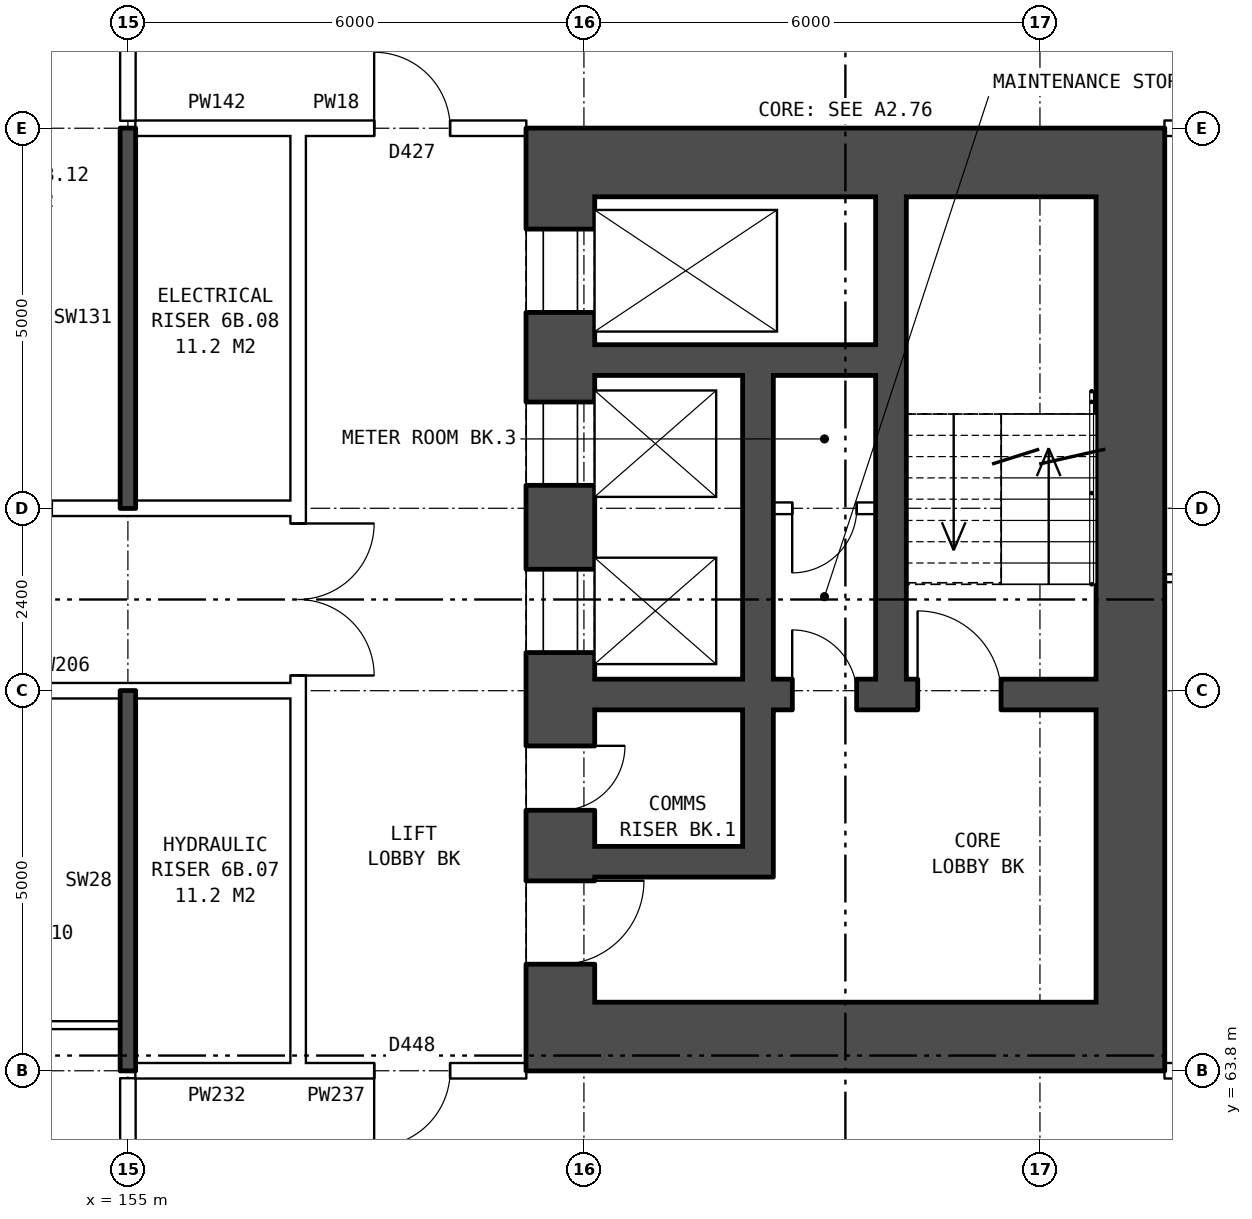
"""IFC4 building model, lengths in metres.
Left out: names, types, materials, properties, quantities, classifications, styles, units other than length and angle.
Written with IfcOpenShell. Run it as: python <this file> out.ifc"""

import sys

from ifc_helpers import new_model, si_unit, direction, frame, frame_2d, origin, place, context, subcontext, project, spatial, rectangle, extrude, element, fill, save


model = new_model("IFC4")
c1 = context("Model", 3, precision=1e-05, world=origin(), true_north=direction((0.0, 1.0)))
c2 = subcontext(c1, "Body", "Model", "MODEL_VIEW")
j1 = project(units=[si_unit("LENGTHUNIT", "METRE"), si_unit("PLANEANGLEUNIT", "RADIAN")], contexts=[c1])
p1 = place(None, origin())
s1 = spatial("IfcSite", under=j1, at=p1, CompositionType="ELEMENT")
p2 = place(p1, origin())
s2 = spatial("IfcBuilding", under=s1, at=p2, CompositionType="ELEMENT")
p3 = place(p2, frame((0.0, 0.0, 25.7)))
s3 = spatial("IfcBuildingStorey", under=s2, at=p3, CompositionType="ELEMENT", Elevation=25.7)
p4 = place(p3, frame((160.69, 75.3, 0.0), z_axis=(0.0, 0.0, 1.0), x_axis=(0.0, -1.0, 0.0)))
e1 = element("IfcWall", 1, at=p4, inside=s3, PredefinedType="SHEAR", context=c2, shape_type="SweptSolid", body=[
    extrude(rectangle(XDim=10.6, YDim=0.9, at=frame_2d((5.3, 0.0))), origin(), (0.0, 0.0, 1.0), 2.85),
])
p5 = place(p4, frame((0.425, 0.0, 0.0)))
e2 = element("IfcOpeningElement", 2, at=p5, cuts=e1, PredefinedType="OPENING", context=c2, shape_type="SweptSolid", body=[
    extrude(rectangle(XDim=1.1, YDim=2.1, at=frame_2d((0.55, 1.05))), frame((0.0, 0.46, 0.0), z_axis=(0.0, -1.0, 0.0), x_axis=(1.0, 0.0, 0.0)), (0.0, 0.0, 1.0), 0.92),
])
p6 = place(p4, frame((2.7, 0.0, 0.0)))
e3 = element("IfcOpeningElement", 3, at=p6, cuts=e1, PredefinedType="OPENING", context=c2, shape_type="SweptSolid", body=[
    extrude(rectangle(XDim=1.1, YDim=2.1, at=frame_2d((0.55, 1.05))), frame((0.0, 0.46, 0.0), z_axis=(0.0, -1.0, 0.0), x_axis=(1.0, 0.0, 0.0)), (0.0, 0.0, 1.0), 0.92),
])
p7 = place(p4, frame((4.9, 0.0, 0.0)))
e4 = element("IfcOpeningElement", 4, at=p7, cuts=e1, PredefinedType="OPENING", context=c2, shape_type="SweptSolid", body=[
    extrude(rectangle(XDim=1.1, YDim=2.1, at=frame_2d((0.55, 1.05))), frame((0.0, 0.46, 0.0), z_axis=(0.0, -1.0, 0.0), x_axis=(1.0, 0.0, 0.0)), (0.0, 0.0, 1.0), 0.92),
])
p8 = place(p4, frame((9.0, 0.0, 0.0)))
e5 = element("IfcOpeningElement", 5, at=p8, cuts=e1, PredefinedType="OPENING", context=c2, shape_type="SweptSolid", body=[
    extrude(rectangle(XDim=1.1, YDim=2.1, at=frame_2d((0.55, 1.05))), frame((0.0, 0.46, 0.0), z_axis=(0.0, -1.0, 0.0), x_axis=(1.0, 0.0, 0.0)), (0.0, 0.0, 1.0), 0.92),
])
p9 = place(p4, frame((7.225, 0.0, 0.0)))
e6 = element("IfcOpeningElement", 6, at=p9, cuts=e1, PredefinedType="OPENING", context=c2, shape_type="SweptSolid", body=[
    extrude(rectangle(XDim=0.85, YDim=2.1, at=frame_2d((0.425, 1.05))), frame((0.0, 0.46, 0.0), z_axis=(0.0, -1.0, 0.0), x_axis=(1.0, 0.0, 0.0)), (0.0, 0.0, 1.0), 0.92),
])
p10 = place(p3, frame((168.19, 75.3, 0.0), z_axis=(0.0, 0.0, 1.0), x_axis=(0.0, -1.0, 0.0)))
e7 = element("IfcWall", 7, at=p10, inside=s3, PredefinedType="SHEAR", context=c2, shape_type="SweptSolid", body=[
    extrude(rectangle(XDim=10.6, YDim=0.9, at=frame_2d((5.3, 0.0))), origin(), (0.0, 0.0, 1.0), 2.85),
])
for number, where, z_axis, x_axis in (
    (8, (160.24, 75.75, 0.0), (0.0, 0.0, 1.0), (1.0, 0.0, 0.0)),
    (9, (160.24, 64.25, 0.0), (0.0, 0.0, 1.0), (1.0, 0.0, 0.0)),
):
    element("IfcWall", number, at=place(p3, frame(where, z_axis=z_axis, x_axis=x_axis)), inside=s3, PredefinedType="SHEAR", context=c2, shape_type="SweptSolid", body=[
        extrude(rectangle(XDim=8.4, YDim=0.9, at=frame_2d((4.2, 0.0))), origin(), (0.0, 0.0, 1.0), 2.85),
    ])
p11 = place(p3, frame((161.14, 73.15, 0.0), z_axis=(0.0, 0.0, 1.0), x_axis=(1.0, 0.0, 0.0)))
e10 = element("IfcWall", 10, at=p11, inside=s3, PredefinedType="SHEAR", context=c2, shape_type="SweptSolid", body=[
    extrude(rectangle(XDim=3.7, YDim=0.4, at=frame_2d((1.85, 0.0))), origin(), (0.0, 0.0, 1.0), 2.85),
])
p12 = place(p3, frame((163.49, 71.2, 0.0), z_axis=(0.0, 0.0, 1.0), x_axis=(1.0, 0.0, 0.0)))
e11 = element("IfcWall", 11, at=p12, inside=s3, PredefinedType="PARTITIONING", context=c2, shape_type="SweptSolid", body=[
    extrude(rectangle(XDim=1.35, YDim=0.15, at=frame_2d((0.675, 0.0))), origin(), (0.0, 0.0, 1.0), 2.85),
])
p13 = place(p12, frame((0.25, 0.0, 0.0)))
e12 = element("IfcOpeningElement", 12, at=p13, cuts=e11, PredefinedType="OPENING", context=c2, shape_type="SweptSolid", body=[
    extrude(rectangle(XDim=0.85, YDim=2.1, at=frame_2d((0.425, 1.05))), frame((0.0, 0.085, 0.0), z_axis=(0.0, -1.0, 0.0), x_axis=(1.0, 0.0, 0.0)), (0.0, 0.0, 1.0), 0.17),
])
p14 = place(p3, frame((161.14, 68.75, 0.0), z_axis=(0.0, 0.0, 1.0), x_axis=(1.0, 0.0, 0.0)))
e13 = element("IfcWall", 13, at=p14, inside=s3, PredefinedType="SHEAR", context=c2, shape_type="SweptSolid", body=[
    extrude(rectangle(XDim=6.6, YDim=0.4, at=frame_2d((3.3, 0.0))), origin(), (0.0, 0.0, 1.0), 2.85),
])
p15 = place(p14, frame((4.25, 0.0, 0.0)))
e14 = element("IfcOpeningElement", 14, at=p15, cuts=e13, PredefinedType="OPENING", context=c2, shape_type="SweptSolid", body=[
    extrude(rectangle(XDim=1.1, YDim=2.1, at=frame_2d((0.55, 1.05))), frame((0.0, 0.21, 0.0), z_axis=(0.0, -1.0, 0.0), x_axis=(1.0, 0.0, 0.0)), (0.0, 0.0, 1.0), 0.42),
])
p16 = place(p14, frame((2.6, 0.0, 0.0)))
e15 = element("IfcOpeningElement", 15, at=p16, cuts=e13, PredefinedType="OPENING", context=c2, shape_type="SweptSolid", body=[
    extrude(rectangle(XDim=0.85, YDim=2.1, at=frame_2d((0.425, 1.05))), frame((0.0, 0.21, 0.0), z_axis=(0.0, -1.0, 0.0), x_axis=(1.0, 0.0, 0.0)), (0.0, 0.0, 1.0), 0.42),
])
p17 = place(p3, frame((161.14, 66.55, 0.0), z_axis=(0.0, 0.0, 1.0), x_axis=(1.0, 0.0, 0.0)))
e16 = element("IfcWall", 16, at=p17, inside=s3, PredefinedType="SHEAR", context=c2, shape_type="SweptSolid", body=[
    extrude(rectangle(XDim=1.95, YDim=0.4, at=frame_2d((0.975, 0.0))), origin(), (0.0, 0.0, 1.0), 2.85),
])
p18 = place(p3, frame((163.29, 72.95, 0.0), z_axis=(0.0, 0.0, 1.0), x_axis=(0.0, -1.0, 0.0)))
e17 = element("IfcWall", 17, at=p18, inside=s3, PredefinedType="SHEAR", context=c2, shape_type="SweptSolid", body=[
    extrude(rectangle(XDim=4.0, YDim=0.4, at=frame_2d((2.0, 0.0))), origin(), (0.0, 0.0, 1.0), 2.85),
])
p19 = place(p3, frame((163.29, 68.55, 0.0), z_axis=(0.0, 0.0, 1.0), x_axis=(0.0, -1.0, 0.0)))
e18 = element("IfcWall", 18, at=p19, inside=s3, PredefinedType="SHEAR", context=c2, shape_type="SweptSolid", body=[
    extrude(rectangle(XDim=2.2, YDim=0.4, at=frame_2d((1.1, 0.0))), origin(), (0.0, 0.0, 1.0), 2.85),
])
p20 = place(p3, frame((165.04, 75.3, 0.0), z_axis=(0.0, 0.0, 1.0), x_axis=(0.0, -1.0, 0.0)))
e19 = element("IfcWall", 19, at=p20, inside=s3, PredefinedType="SHEAR", context=c2, shape_type="SweptSolid", body=[
    extrude(rectangle(XDim=6.35, YDim=0.4, at=frame_2d((3.175, 0.0))), origin(), (0.0, 0.0, 1.0), 2.85),
])
p21 = place(p3, frame((157.24, 63.9, 0.0), z_axis=(0.0, 0.0, 1.0), x_axis=(0.0, 1.0, 0.0)))
e20 = element("IfcWall", 20, at=p21, inside=s3, PredefinedType="PARTITIONING", context=c2, shape_type="SweptSolid", body=[
    extrude(rectangle(XDim=12.2, YDim=0.2, at=frame_2d((6.1, 0.0))), origin(), (0.0, 0.0, 1.0), 2.85),
])
p22 = place(p21, frame((5.1, 0.0, 0.0)))
e21 = element("IfcOpeningElement", 21, at=p22, cuts=e20, PredefinedType="OPENING", context=c2, shape_type="SweptSolid", body=[
    extrude(rectangle(XDim=2.0, YDim=2.1, at=frame_2d((1.0, 1.05))), frame((0.0, 0.11, 0.0), z_axis=(0.0, -1.0, 0.0), x_axis=(1.0, 0.0, 0.0)), (0.0, 0.0, 1.0), 0.22),
])
p23 = place(p3, frame((155.1, 63.8, 0.0), z_axis=(0.0, 0.0, 1.0), x_axis=(1.0, 0.0, 0.0)))
e22 = element("IfcWall", 22, at=p23, inside=s3, PredefinedType="PARTITIONING", context=c2, shape_type="SweptSolid", body=[
    extrude(rectangle(XDim=2.14, YDim=0.2, at=frame_2d((1.07, 0.0))), origin(), (0.0, 0.0, 1.0), 2.85),
])
p24 = place(p3, frame((157.24, 63.8, 0.0), z_axis=(0.0, 0.0, 1.0), x_axis=(1.0, 0.0, 0.0)))
e23 = element("IfcWall", 23, at=p24, inside=s3, PredefinedType="PARTITIONING", context=c2, shape_type="SweptSolid", body=[
    extrude(rectangle(XDim=3.0, YDim=0.2, at=frame_2d((1.5, 0.0))), origin(), (0.0, 0.0, 1.0), 2.85),
])
p25 = place(p24, frame((1.0, 0.0, 0.0)))
e24 = element("IfcOpeningElement", 24, at=p25, cuts=e23, PredefinedType="OPENING", context=c2, shape_type="SweptSolid", body=[
    extrude(rectangle(XDim=1.0, YDim=2.1, at=frame_2d((0.5, 1.05))), frame((0.0, 0.11, 0.0), z_axis=(0.0, -1.0, 0.0), x_axis=(1.0, 0.0, 0.0)), (0.0, 0.0, 1.0), 0.22),
])
p26 = place(p3, frame((168.64, 63.8, 0.0), z_axis=(0.0, 0.0, 1.0), x_axis=(1.0, 0.0, 0.0)))
e25 = element("IfcWall", 25, at=p26, inside=s3, PredefinedType="PARTITIONING", context=c2, shape_type="SweptSolid", body=[
    extrude(rectangle(XDim=6.35, YDim=0.2, at=frame_2d((3.175, 0.0))), origin(), (0.0, 0.0, 1.0), 2.85),
])
p27 = place(p26, frame((1.78, 0.0, 0.0)))
e26 = element("IfcOpeningElement", 26, at=p27, cuts=e25, PredefinedType="OPENING", context=c2, shape_type="SweptSolid", body=[
    extrude(rectangle(XDim=0.8, YDim=2.1, at=frame_2d((0.4, 1.05))), frame((0.0, 0.11, 0.0), z_axis=(0.0, -1.0, 0.0), x_axis=(1.0, 0.0, 0.0)), (0.0, 0.0, 1.0), 0.22),
])
p28 = place(p3, frame((152.0, 64.4, 0.0), z_axis=(0.0, 0.0, 1.0), x_axis=(1.0, 0.0, 0.0)))
e27 = element("IfcWall", 27, at=p28, inside=s3, PredefinedType="PARTITIONING", context=c2, shape_type="SweptSolid", body=[
    extrude(rectangle(XDim=2.9, YDim=0.1, at=frame_2d((1.45, 0.0))), origin(), (0.0, 0.0, 1.0), 2.85),
])
p29 = place(p3, frame((142.76, 68.8, 0.0), z_axis=(0.0, 0.0, 1.0), x_axis=(1.0, 0.0, 0.0)))
e28 = element("IfcWall", 28, at=p29, inside=s3, PredefinedType="PARTITIONING", context=c2, shape_type="SweptSolid", body=[
    extrude(rectangle(XDim=14.48, YDim=0.2, at=frame_2d((7.24, 0.0))), origin(), (0.0, 0.0, 1.0), 2.85),
])
p30 = place(p29, frame((4.24, 0.0, 0.0)))
e29 = element("IfcOpeningElement", 29, at=p30, cuts=e28, PredefinedType="OPENING", context=c2, shape_type="SweptSolid", body=[
    extrude(rectangle(XDim=1.0, YDim=2.1, at=frame_2d((0.5, 1.05))), frame((0.0, 0.11, 0.0), z_axis=(0.0, -1.0, 0.0), x_axis=(1.0, 0.0, 0.0)), (0.0, 0.0, 1.0), 0.22),
])
p31 = place(p29, frame((7.24, 0.0, 0.0)))
e30 = element("IfcOpeningElement", 30, at=p31, cuts=e28, PredefinedType="OPENING", context=c2, shape_type="SweptSolid", body=[
    extrude(rectangle(XDim=1.0, YDim=2.1, at=frame_2d((0.5, 1.05))), frame((0.0, 0.11, 0.0), z_axis=(0.0, -1.0, 0.0), x_axis=(1.0, 0.0, 0.0)), (0.0, 0.0, 1.0), 0.22),
])
p32 = place(p3, frame((168.64, 70.28, 0.0), z_axis=(0.0, 0.0, 1.0), x_axis=(1.0, 0.0, 0.0)))
e31 = element("IfcWall", 31, at=p32, inside=s3, PredefinedType="PARTITIONING", context=c2, shape_type="SweptSolid", body=[
    extrude(rectangle(XDim=4.26, YDim=0.1, at=frame_2d((2.13, 0.0))), origin(), (0.0, 0.0, 1.0), 2.85),
])
p33 = place(p3, frame((142.76, 71.2, 0.0), z_axis=(0.0, 0.0, 1.0), x_axis=(1.0, 0.0, 0.0)))
e32 = element("IfcWall", 32, at=p33, inside=s3, PredefinedType="PARTITIONING", context=c2, shape_type="SweptSolid", body=[
    extrude(rectangle(XDim=14.48, YDim=0.2, at=frame_2d((7.24, 0.0))), origin(), (0.0, 0.0, 1.0), 2.85),
])
p34 = place(p33, frame((4.24, 0.0, 0.0)))
e33 = element("IfcOpeningElement", 33, at=p34, cuts=e32, PredefinedType="OPENING", context=c2, shape_type="SweptSolid", body=[
    extrude(rectangle(XDim=1.0, YDim=2.1, at=frame_2d((0.5, 1.05))), frame((0.0, 0.11, 0.0), z_axis=(0.0, -1.0, 0.0), x_axis=(1.0, 0.0, 0.0)), (0.0, 0.0, 1.0), 0.22),
])
p35 = place(p33, frame((10.24, 0.0, 0.0)))
e34 = element("IfcOpeningElement", 34, at=p35, cuts=e32, PredefinedType="OPENING", context=c2, shape_type="SweptSolid", body=[
    extrude(rectangle(XDim=1.0, YDim=2.1, at=frame_2d((0.5, 1.05))), frame((0.0, 0.11, 0.0), z_axis=(0.0, -1.0, 0.0), x_axis=(1.0, 0.0, 0.0)), (0.0, 0.0, 1.0), 0.22),
])
p36 = place(p3, frame((155.1, 76.2, 0.0), z_axis=(0.0, 0.0, 1.0), x_axis=(1.0, 0.0, 0.0)))
e35 = element("IfcWall", 35, at=p36, inside=s3, PredefinedType="PARTITIONING", context=c2, shape_type="SweptSolid", body=[
    extrude(rectangle(XDim=2.14, YDim=0.2, at=frame_2d((1.07, 0.0))), origin(), (0.0, 0.0, 1.0), 2.85),
])
p37 = place(p3, frame((157.24, 76.2, 0.0), z_axis=(0.0, 0.0, 1.0), x_axis=(1.0, 0.0, 0.0)))
e36 = element("IfcWall", 36, at=p37, inside=s3, PredefinedType="PARTITIONING", context=c2, shape_type="SweptSolid", body=[
    extrude(rectangle(XDim=3.0, YDim=0.2, at=frame_2d((1.5, 0.0))), origin(), (0.0, 0.0, 1.0), 2.85),
])
p38 = place(p37, frame((1.0, 0.0, 0.0)))
e37 = element("IfcOpeningElement", 37, at=p38, cuts=e36, PredefinedType="OPENING", context=c2, shape_type="SweptSolid", body=[
    extrude(rectangle(XDim=1.0, YDim=2.1, at=frame_2d((0.5, 1.05))), frame((0.0, 0.11, 0.0), z_axis=(0.0, -1.0, 0.0), x_axis=(1.0, 0.0, 0.0)), (0.0, 0.0, 1.0), 0.22),
])
p39 = place(p3, frame((168.64, 76.2, 0.0), z_axis=(0.0, 0.0, 1.0), x_axis=(1.0, 0.0, 0.0)))
e38 = element("IfcWall", 38, at=p39, inside=s3, PredefinedType="PARTITIONING", context=c2, shape_type="SweptSolid", body=[
    extrude(rectangle(XDim=6.35, YDim=0.2, at=frame_2d((3.175, 0.0))), origin(), (0.0, 0.0, 1.0), 2.85),
])
p40 = place(p39, frame((1.78, 0.0, 0.0)))
e39 = element("IfcOpeningElement", 39, at=p40, cuts=e38, PredefinedType="OPENING", context=c2, shape_type="SweptSolid", body=[
    extrude(rectangle(XDim=0.8, YDim=2.1, at=frame_2d((0.4, 1.05))), frame((0.0, 0.11, 0.0), z_axis=(0.0, -1.0, 0.0), x_axis=(1.0, 0.0, 0.0)), (0.0, 0.0, 1.0), 0.22),
])
p41 = place(p3, frame((155.0, 61.5, 0.0), z_axis=(0.0, 0.0, 1.0), x_axis=(0.0, 1.0, 0.0)))
e40 = element("IfcWall", 40, at=p41, inside=s3, PredefinedType="PARTITIONING", context=c2, shape_type="SweptSolid", body=[
    extrude(rectangle(XDim=2.2, YDim=0.2, at=frame_2d((1.1, 0.0))), origin(), (0.0, 0.0, 1.0), 2.85),
])
for number, where, z_axis, x_axis in (
    (41, (155.0, 63.8, 0.0), (0.0, 0.0, 1.0), (0.0, 1.0, 0.0)),
    (42, (155.0, 71.2, 0.0), (0.0, 0.0, 1.0), (0.0, 1.0, 0.0)),
):
    element("IfcWall", number, at=place(p3, frame(where, z_axis=z_axis, x_axis=x_axis)), inside=s3, PredefinedType="SOLIDWALL", context=c2, shape_type="SweptSolid", body=[
        extrude(rectangle(XDim=5.0, YDim=0.2, at=frame_2d((2.5, 0.0))), origin(), (0.0, 0.0, 1.0), 2.85),
    ])
p42 = place(p3, frame((155.0, 76.3, 0.0), z_axis=(0.0, 0.0, 1.0), x_axis=(0.0, 1.0, 0.0)))
e43 = element("IfcWall", 43, at=p42, inside=s3, PredefinedType="PARTITIONING", context=c2, shape_type="SweptSolid", body=[
    extrude(rectangle(XDim=2.2, YDim=0.2, at=frame_2d((1.1, 0.0))), origin(), (0.0, 0.0, 1.0), 2.85),
])
p43 = place(p5, origin())
e44 = element("IfcDoor", 44, at=p43, inside=s3, OperationType="DOUBLE_DOOR_SLIDING", PredefinedType="DOOR", context=c2, shape_type="SweptSolid", body=[
    extrude(rectangle(XDim=1.1, YDim=2.1, at=frame_2d((0.55, 1.05))), frame((0.0, 0.435, 0.0), z_axis=(0.0, -1.0, 0.0), x_axis=(1.0, 0.0, 0.0)), (0.0, 0.0, 1.0), 0.05),
])
fill(e2, e44)
p44 = place(p6, origin())
e45 = element("IfcDoor", 45, at=p44, inside=s3, OperationType="DOUBLE_DOOR_SLIDING", PredefinedType="DOOR", context=c2, shape_type="SweptSolid", body=[
    extrude(rectangle(XDim=1.1, YDim=2.1, at=frame_2d((0.55, 1.05))), frame((0.0, 0.435, 0.0), z_axis=(0.0, -1.0, 0.0), x_axis=(1.0, 0.0, 0.0)), (0.0, 0.0, 1.0), 0.05),
])
fill(e3, e45)
p45 = place(p7, origin())
e46 = element("IfcDoor", 46, at=p45, inside=s3, OperationType="DOUBLE_DOOR_SLIDING", PredefinedType="DOOR", context=c2, shape_type="SweptSolid", body=[
    extrude(rectangle(XDim=1.1, YDim=2.1, at=frame_2d((0.55, 1.05))), frame((0.0, 0.435, 0.0), z_axis=(0.0, -1.0, 0.0), x_axis=(1.0, 0.0, 0.0)), (0.0, 0.0, 1.0), 0.05),
])
fill(e4, e46)
p46 = place(p8, origin())
e47 = element("IfcDoor", 47, at=p46, inside=s3, OperationType="SINGLE_SWING_LEFT", PredefinedType="DOOR", context=c2, shape_type="SweptSolid", body=[
    extrude(rectangle(XDim=1.1, YDim=2.1, at=frame_2d((0.55, 1.05))), frame((0.0, 0.435, 0.0), z_axis=(0.0, -1.0, 0.0), x_axis=(1.0, 0.0, 0.0)), (0.0, 0.0, 1.0), 0.05),
])
fill(e5, e47)
p47 = place(p15, origin())
e48 = element("IfcDoor", 48, at=p47, inside=s3, OperationType="SINGLE_SWING_LEFT", PredefinedType="DOOR", context=c2, shape_type="SweptSolid", body=[
    extrude(rectangle(XDim=1.1, YDim=2.1, at=frame_2d((0.55, 1.05))), frame((0.0, 0.025, 0.0), z_axis=(0.0, -1.0, 0.0), x_axis=(1.0, 0.0, 0.0)), (0.0, 0.0, 1.0), 0.05),
])
fill(e14, e48)
p48 = place(p9, origin())
e49 = element("IfcDoor", 49, at=p48, inside=s3, OperationType="SINGLE_SWING_LEFT", PredefinedType="DOOR", context=c2, shape_type="SweptSolid", body=[
    extrude(rectangle(XDim=0.85, YDim=2.1, at=frame_2d((0.425, 1.05))), frame((0.0, 0.435, 0.0), z_axis=(0.0, -1.0, 0.0), x_axis=(1.0, 0.0, 0.0)), (0.0, 0.0, 1.0), 0.05),
])
fill(e6, e49)
p49 = place(p16, origin())
e50 = element("IfcDoor", 50, at=p49, inside=s3, OperationType="SINGLE_SWING_LEFT", PredefinedType="DOOR", context=c2, shape_type="SweptSolid", body=[
    extrude(rectangle(XDim=0.85, YDim=2.1, at=frame_2d((0.425, 1.05))), frame((0.0, 0.025, 0.0), z_axis=(0.0, -1.0, 0.0), x_axis=(1.0, 0.0, 0.0)), (0.0, 0.0, 1.0), 0.05),
])
fill(e15, e50)
p50 = place(p13, frame((0.85, 0.0, 0.0), z_axis=(0.0, 0.0, 1.0), x_axis=(-1.0, 0.0, 0.0)))
e51 = element("IfcDoor", 51, at=p50, inside=s3, OperationType="SINGLE_SWING_RIGHT", PredefinedType="DOOR", context=c2, shape_type="SweptSolid", body=[
    extrude(rectangle(XDim=0.85, YDim=2.1, at=frame_2d((0.425, 1.05))), frame((0.0, 0.025, 0.0), z_axis=(0.0, -1.0, 0.0), x_axis=(1.0, 0.0, 0.0)), (0.0, 0.0, 1.0), 0.05),
])
fill(e12, e51)
p51 = place(p22, frame((2.0, 0.0, 0.0), z_axis=(0.0, 0.0, 1.0), x_axis=(-1.0, 0.0, 0.0)))
e52 = element("IfcDoor", 52, at=p51, inside=s3, OperationType="DOUBLE_DOOR_SINGLE_SWING", PredefinedType="DOOR", context=c2, shape_type="SweptSolid", body=[
    extrude(rectangle(XDim=2.0, YDim=2.1, at=frame_2d((1.0, 1.05))), frame((0.0, 0.025, 0.0), z_axis=(0.0, -1.0, 0.0), x_axis=(1.0, 0.0, 0.0)), (0.0, 0.0, 1.0), 0.05),
])
fill(e21, e52)
p52 = place(p25, frame((1.0, 0.0, 0.0), z_axis=(0.0, 0.0, 1.0), x_axis=(-1.0, 0.0, 0.0)))
e53 = element("IfcDoor", 53, at=p52, inside=s3, OperationType="SINGLE_SWING_RIGHT", PredefinedType="DOOR", context=c2, shape_type="SweptSolid", body=[
    extrude(rectangle(XDim=1.0, YDim=2.1, at=frame_2d((0.5, 1.05))), frame((0.0, 0.025, 0.0), z_axis=(0.0, -1.0, 0.0), x_axis=(1.0, 0.0, 0.0)), (0.0, 0.0, 1.0), 0.05),
])
fill(e24, e53)
p53 = place(p38, origin())
e54 = element("IfcDoor", 54, at=p53, inside=s3, OperationType="SINGLE_SWING_LEFT", PredefinedType="DOOR", context=c2, shape_type="SweptSolid", body=[
    extrude(rectangle(XDim=1.0, YDim=2.1, at=frame_2d((0.5, 1.05))), frame((0.0, 0.025, 0.0), z_axis=(0.0, -1.0, 0.0), x_axis=(1.0, 0.0, 0.0)), (0.0, 0.0, 1.0), 0.05),
])
fill(e37, e54)
save(model, sys.argv[1])
